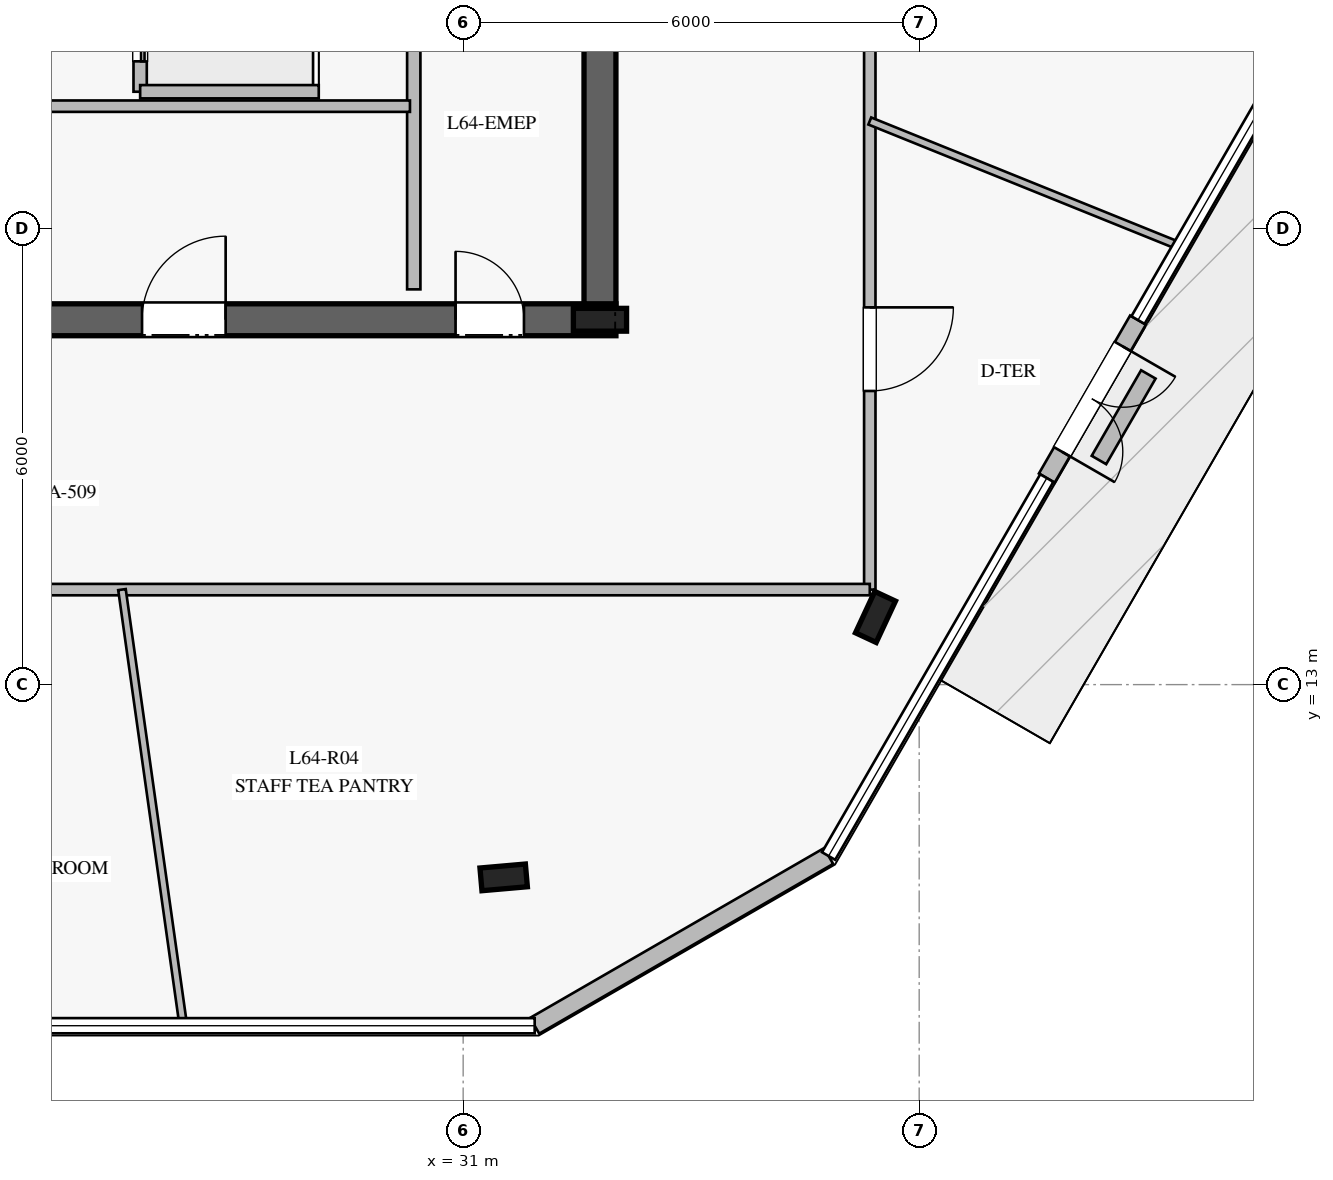
"""IFC4 building model, lengths in metres.
Left out: names, types, materials, properties, quantities, classifications, styles, units other than length and angle.
Written with IfcOpenShell. Run it as: python <this file> out.ifc"""

import sys

from ifc_helpers import new_model, si_unit, direction, frame, frame_2d, origin, origin_2d, place, context, subcontext, project, spatial, rectangle, i_section, extrude, element, fill, save


model = new_model("IFC4")
c1 = context("Model", 3, precision=1e-05, world=origin(), true_north=direction((0.0, 1.0)))
c2 = subcontext(c1, "Body", "Model", "MODEL_VIEW")
j1 = project(units=[si_unit("LENGTHUNIT", "METRE"), si_unit("PLANEANGLEUNIT", "RADIAN")], contexts=[c1])
p1 = place(None, origin())
s1 = spatial("IfcSite", under=j1, at=p1, CompositionType="ELEMENT")
p2 = place(p1, origin())
s2 = spatial("IfcBuilding", under=s1, at=p2, CompositionType="ELEMENT")
p3 = place(p2, frame((0.0, 0.0, 266.2)))
s3 = spatial("IfcBuildingStorey", under=s2, at=p3, CompositionType="ELEMENT", Elevation=266.2)
p4 = place(p3, frame((16.99, 17.8, 0.0), z_axis=(0.0, 0.0, 1.0), x_axis=(1.0, 0.0, 0.0)))
e1 = element("IfcWall", 1, at=p4, inside=s3, PredefinedType="SHEAR", context=c2, shape_type="SweptSolid", body=[
    extrude(rectangle(XDim=16.02, YDim=0.42, at=frame_2d((8.01, 0.0))), origin(), (0.0, 0.0, 1.0), 3.78),
])
p5 = place(p4, frame((4.96, 0.0, 0.0)))
e2 = element("IfcOpeningElement", 2, at=p5, cuts=e1, PredefinedType="OPENING", context=c2, shape_type="SweptSolid", body=[
    extrude(rectangle(XDim=1.2, YDim=2.25, at=frame_2d((0.6, 1.125))), frame((0.0, 0.22, 0.0), z_axis=(0.0, -1.0, 0.0), x_axis=(1.0, 0.0, 0.0)), (0.0, 0.0, 1.0), 0.44),
])
p6 = place(p4, frame((13.91, 0.0, 0.0)))
e3 = element("IfcOpeningElement", 3, at=p6, cuts=e1, PredefinedType="OPENING", context=c2, shape_type="SweptSolid", body=[
    extrude(rectangle(XDim=0.9, YDim=2.1, at=frame_2d((0.45, 1.05))), frame((0.0, 0.22, 0.0), z_axis=(0.0, -1.0, 0.0), x_axis=(1.0, 0.0, 0.0)), (0.0, 0.0, 1.0), 0.44),
])
p7 = place(p4, frame((9.785, 0.0, 0.0)))
e4 = element("IfcOpeningElement", 4, at=p7, cuts=e1, PredefinedType="OPENING", context=c2, shape_type="SweptSolid", body=[
    extrude(rectangle(XDim=1.1, YDim=2.2, at=frame_2d((0.55, 1.1))), frame((0.0, 0.22, 0.0), z_axis=(0.0, -1.0, 0.0), x_axis=(1.0, 0.0, 0.0)), (0.0, 0.0, 1.0), 0.44),
])
p8 = place(p3, frame((32.8, 18.01, 0.0), z_axis=(0.0, 0.0, 1.0), x_axis=(0.0, 1.0, 0.0)))
e5 = element("IfcWall", 5, at=p8, inside=s3, PredefinedType="SHEAR", context=c2, shape_type="SweptSolid", body=[
    extrude(rectangle(XDim=13.98, YDim=0.42, at=frame_2d((6.99, 0.0))), origin(), (0.0, 0.0, 1.0), 3.78),
])
p9 = place(p3, frame((32.8, 17.8, 0.0), z_axis=(0.0, 0.0, 1.0), x_axis=(1.0, 0.0, 0.0)))
e6 = element("IfcColumn", 6, at=p9, inside=s3, PredefinedType="COLUMN", context=c2, shape_type="SweptSolid", body=[
    extrude(i_section(OverallWidth=0.3, OverallDepth=0.7, WebThickness=0.017, FlangeThickness=0.032, at=origin_2d()), origin(), (0.0, 0.0, 1.0), 4.0),
])
for number, where, z_axis, x_axis in (
    (7, (31.533, 10.464, 0.0), (0.0, 0.0, 1.0), (0.996, 0.087, 0.0)),
    (8, (36.425, 13.89, 0.0), (0.0, 0.0, 1.0), (0.423, 0.906, 0.0)),
):
    element("IfcColumn", number, at=place(p3, frame(where, z_axis=z_axis, x_axis=x_axis)), inside=s3, PredefinedType="COLUMN", context=c2, shape_type="SweptSolid", body=[
        extrude(i_section(OverallWidth=0.3, OverallDepth=0.6, WebThickness=0.015, FlangeThickness=0.03, at=origin_2d()), origin(), (0.0, 0.0, 1.0), 4.0),
    ])
p10 = place(p3, frame((31.941, 8.512, 0.0), z_axis=(0.0, 0.0, 1.0), x_axis=(0.865983458261, 0.500072644742, 0.0)))
e9 = element("IfcWall", 9, at=p10, inside=s3, PredefinedType="STANDARD", context=c2, shape_type="SweptSolid", body=[
    extrude(rectangle(XDim=4.466, YDim=0.24, at=frame_2d((2.233, 0.0))), origin(), (0.0, 0.0, 1.0), 3.78),
])
p11 = place(p3, frame((38.679, 15.717, 0.0), z_axis=(0.0, 0.0, 1.0), x_axis=(0.499913221443, 0.866075499611, 0.0)))
e10 = element("IfcWall", 10, at=p11, inside=s3, PredefinedType="STANDARD", context=c2, shape_type="SweptSolid", body=[
    extrude(rectangle(XDim=2.4, YDim=0.24, at=frame_2d((1.2, 0.0))), origin(), (0.0, 0.0, 1.0), 3.78),
])
p12 = place(p11, frame((0.4, 0.0, 0.0)))
e11 = element("IfcOpeningElement", 11, at=p12, cuts=e10, PredefinedType="OPENING", context=c2, shape_type="SweptSolid", body=[
    extrude(rectangle(XDim=1.6, YDim=2.25, at=frame_2d((0.8, 1.125))), frame((0.0, 0.13, 0.0), z_axis=(0.0, -1.0, 0.0), x_axis=(1.0, 0.0, 0.0)), (0.0, 0.0, 1.0), 0.26),
])
p13 = place(p3, frame((39.365, 15.955, 0.0), z_axis=(0.0, 0.0, 1.0), x_axis=(0.49989585183, 0.866085525409, 0.0)))
e12 = element("IfcWall", 12, at=p13, inside=s3, PredefinedType="USERDEFINED", context=c2, shape_type="SweptSolid", body=[
    extrude(rectangle(XDim=1.3, YDim=0.22, at=frame_2d((0.65, 0.0))), origin(), (0.0, 0.0, 1.0), 0.4),
])
p14 = place(p3, frame((30.35, 18.2, 0.0), z_axis=(0.0, 0.0, 1.0), x_axis=(0.0, 1.0, 0.0)))
e13 = element("IfcWall", 13, at=p14, inside=s3, PredefinedType="PARTITIONING", context=c2, shape_type="SweptSolid", body=[
    extrude(rectangle(XDim=3.48, YDim=0.175, at=frame_2d((1.74, 0.0))), origin(), (0.0, 0.0, 1.0), 3.78),
])
p15 = place(p3, frame((24.4, 20.61, 0.0), z_axis=(0.0, 0.0, 1.0), x_axis=(1.0, 0.0, 0.0)))
e14 = element("IfcWall", 14, at=p15, inside=s3, PredefinedType="PARTITIONING", context=c2, shape_type="SweptSolid", body=[
    extrude(rectangle(XDim=5.9, YDim=0.15, at=frame_2d((2.95, 0.0))), origin(), (0.0, 0.0, 1.0), 3.78),
])
p16 = place(p3, frame((26.75, 20.8, 0.0), z_axis=(0.0, 0.0, 1.0), x_axis=(0.0, 1.0, 0.0)))
e15 = element("IfcWall", 15, at=p16, inside=s3, PredefinedType="PARTITIONING", context=c2, shape_type="SweptSolid", body=[
    extrude(rectangle(XDim=1.9, YDim=0.175, at=frame_2d((0.95, 0.0))), origin(), (0.0, 0.0, 1.0), 3.78),
])
p17 = place(p16, frame((0.4, 0.0, 0.0)))
e16 = element("IfcOpeningElement", 16, at=p17, cuts=e15, PredefinedType="OPENING", context=c2, shape_type="SweptSolid", body=[
    extrude(rectangle(XDim=1.1, YDim=2.2, at=frame_2d((0.55, 1.1))), frame((0.0, 0.098, 0.0), z_axis=(0.0, -1.0, 0.0), x_axis=(1.0, 0.0, 0.0)), (0.0, 0.0, 1.0), 0.195),
])
p18 = place(p3, frame((26.75, 20.8, 0.0), z_axis=(0.0, 0.0, 1.0), x_axis=(1.0, 0.0, 0.0)))
e17 = element("IfcWall", 17, at=p18, inside=s3, PredefinedType="PARTITIONING", context=c2, shape_type="SweptSolid", body=[
    extrude(rectangle(XDim=2.35, YDim=0.175, at=frame_2d((1.175, 0.0))), origin(), (0.0, 0.0, 1.0), 3.78),
])
p19 = place(p3, frame((36.35, 35.75, 0.0), z_axis=(0.0, 0.0, 1.0), x_axis=(0.0, -1.0, 0.0)))
e18 = element("IfcWall", 18, at=p19, inside=s3, PredefinedType="PARTITIONING", context=c2, shape_type="SweptSolid", body=[
    extrude(rectangle(XDim=21.5, YDim=0.15, at=frame_2d((10.75, 0.0))), origin(), (0.0, 0.0, 1.0), 2.43),
])
p20 = place(p19, frame((17.787, 0.0, 0.0)))
e19 = element("IfcOpeningElement", 19, at=p20, cuts=e18, PredefinedType="OPENING", context=c2, shape_type="SweptSolid", body=[
    extrude(rectangle(XDim=1.1, YDim=2.2, at=frame_2d((0.55, 1.1))), frame((0.0, 0.085, 0.0), z_axis=(0.0, -1.0, 0.0), x_axis=(1.0, 0.0, 0.0)), (0.0, 0.0, 1.0), 0.17),
])
p21 = place(p19, frame((10.2, 0.0, 0.0)))
e20 = element("IfcOpeningElement", 20, at=p21, cuts=e18, PredefinedType="OPENING", context=c2, shape_type="SweptSolid", body=[
    extrude(rectangle(XDim=1.1, YDim=2.2, at=frame_2d((0.55, 1.1))), frame((0.0, 0.085, 0.0), z_axis=(0.0, -1.0, 0.0), x_axis=(1.0, 0.0, 0.0)), (0.0, 0.0, 1.0), 0.17),
])
p22 = place(p3, frame((36.35, 14.25, 0.0), z_axis=(0.0, 0.0, 1.0), x_axis=(-1.0, 0.0, 0.0)))
e21 = element("IfcWall", 21, at=p22, inside=s3, PredefinedType="PARTITIONING", context=c2, shape_type="SweptSolid", body=[
    extrude(rectangle(XDim=22.7, YDim=0.15, at=frame_2d((11.35, 0.0))), origin(), (0.0, 0.0, 1.0), 2.43),
])
p23 = place(p22, frame((12.136, 0.0, 0.0)))
e22 = element("IfcOpeningElement", 22, at=p23, cuts=e21, PredefinedType="OPENING", context=c2, shape_type="SweptSolid", body=[
    extrude(rectangle(XDim=1.1, YDim=2.2, at=frame_2d((0.55, 1.1))), frame((0.0, 0.085, 0.0), z_axis=(0.0, -1.0, 0.0), x_axis=(1.0, 0.0, 0.0)), (0.0, 0.0, 1.0), 0.17),
])
p24 = place(p22, frame((18.391, 0.0, 0.0)))
e23 = element("IfcOpeningElement", 23, at=p24, cuts=e21, PredefinedType="OPENING", context=c2, shape_type="SweptSolid", body=[
    extrude(rectangle(XDim=1.1, YDim=2.2, at=frame_2d((0.55, 1.1))), frame((0.0, 0.085, 0.0), z_axis=(0.0, -1.0, 0.0), x_axis=(1.0, 0.0, 0.0)), (0.0, 0.0, 1.0), 0.17),
])
p25 = place(p3, frame((26.511, 14.25, 0.0), z_axis=(0.0, 0.0, 1.0), x_axis=(0.139303384613, -0.990249749828, 0.0)))
e24 = element("IfcWall", 24, at=p25, inside=s3, PredefinedType="MOVABLE", context=c2, shape_type="SweptSolid", body=[
    extrude(rectangle(XDim=5.778, YDim=0.1, at=frame_2d((2.889, 0.0))), origin(), (0.0, 0.0, 1.0), 3.05),
])
p26 = place(p3, frame((36.35, 20.415, 0.0), z_axis=(0.0, 0.0, 1.0), x_axis=(0.927229589725, -0.374493375026, 0.0)))
e25 = element("IfcWall", 25, at=p26, inside=s3, PredefinedType="MOVABLE", context=c2, shape_type="SweptSolid", body=[
    extrude(rectangle(XDim=4.393, YDim=0.1, at=frame_2d((2.196, 0.0))), origin(), (0.0, 0.0, 1.0), 2.43),
])
p27 = place(p12, frame((1.6, 0.0, 0.0), z_axis=(0.0, 0.0, 1.0), x_axis=(-1.0, 0.0, 0.0)))
e26 = element("IfcDoor", 26, at=p27, inside=s3, OperationType="DOUBLE_DOOR_SINGLE_SWING", PredefinedType="DOOR", context=c2, shape_type="SweptSolid", body=[
    extrude(rectangle(XDim=1.6, YDim=2.25, at=frame_2d((0.8, 1.125))), frame((0.0, 0.025, 0.0), z_axis=(0.0, -1.0, 0.0), x_axis=(1.0, 0.0, 0.0)), (0.0, 0.0, 1.0), 0.05),
])
fill(e11, e26)
p28 = place(p6, origin())
e27 = element("IfcDoor", 27, at=p28, inside=s3, OperationType="SINGLE_SWING_LEFT", PredefinedType="DOOR", context=c2, shape_type="SweptSolid", body=[
    extrude(rectangle(XDim=0.9, YDim=2.1, at=frame_2d((0.45, 1.05))), frame((0.0, 0.025, 0.0), z_axis=(0.0, -1.0, 0.0), x_axis=(1.0, 0.0, 0.0)), (0.0, 0.0, 1.0), 0.05),
])
fill(e3, e27)
p29 = place(p7, origin())
e28 = element("IfcDoor", 28, at=p29, inside=s3, OperationType="SINGLE_SWING_RIGHT", PredefinedType="DOOR", context=c2, shape_type="SweptSolid", body=[
    extrude(rectangle(XDim=1.1, YDim=2.2, at=frame_2d((0.55, 1.1))), frame((0.0, 0.025, 0.0), z_axis=(0.0, -1.0, 0.0), x_axis=(1.0, 0.0, 0.0)), (0.0, 0.0, 1.0), 0.05),
])
fill(e4, e28)
p30 = place(p17, origin())
e29 = element("IfcDoor", 29, at=p30, inside=s3, OperationType="DOUBLE_DOOR_SLIDING", PredefinedType="DOOR", context=c2, shape_type="SweptSolid", body=[
    extrude(rectangle(XDim=1.1, YDim=2.2, at=frame_2d((0.55, 1.1))), frame((0.0, 0.025, 0.0), z_axis=(0.0, -1.0, 0.0), x_axis=(1.0, 0.0, 0.0)), (0.0, 0.0, 1.0), 0.05),
])
fill(e16, e29)
p31 = place(p20, origin())
e30 = element("IfcDoor", 30, at=p31, inside=s3, OperationType="SINGLE_SWING_LEFT", PredefinedType="DOOR", context=c2, shape_type="SweptSolid", body=[
    extrude(rectangle(XDim=1.1, YDim=2.2, at=frame_2d((0.55, 1.1))), frame((0.0, 0.025, 0.0), z_axis=(0.0, -1.0, 0.0), x_axis=(1.0, 0.0, 0.0)), (0.0, 0.0, 1.0), 0.05),
])
fill(e19, e30)
save(model, sys.argv[1])
